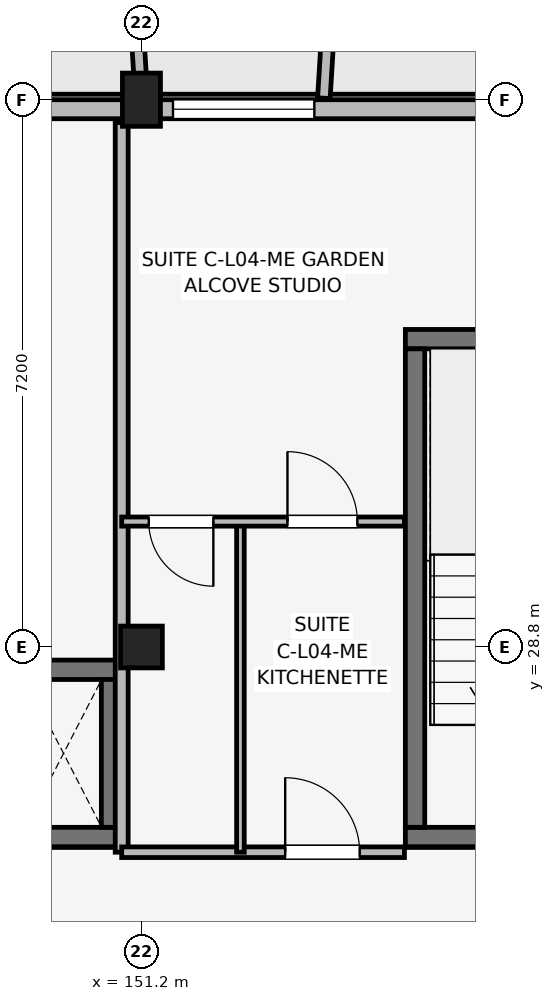
"""IFC4 building model, lengths in metres.
Left out: names, types, materials, properties, quantities, classifications, styles, units other than length and angle.
Written with IfcOpenShell. Run it as: python <this file> out.ifc"""

import sys

from ifc_helpers import new_model, si_unit, direction, frame, frame_2d, origin, origin_2d, place, context, subcontext, project, spatial, rectangle, extrude, element, fill, save


model = new_model("IFC4")
c1 = context("Model", 3, precision=1e-05, world=origin(), true_north=direction((0.0, 1.0)))
c2 = subcontext(c1, "Body", "Model", "MODEL_VIEW")
j1 = project(units=[si_unit("LENGTHUNIT", "METRE"), si_unit("PLANEANGLEUNIT", "RADIAN")], contexts=[c1])
p1 = place(None, origin())
s1 = spatial("IfcSite", under=j1, at=p1, CompositionType="ELEMENT")
p2 = place(p1, origin())
s2 = spatial("IfcBuilding", under=s1, at=p2, CompositionType="ELEMENT")
p3 = place(p2, frame((0.0, 0.0, 15.0)))
s3 = spatial("IfcBuildingStorey", under=s2, at=p3, CompositionType="ELEMENT", Elevation=15.0)
p4 = place(p3, frame((151.2, 28.8, 0.0), z_axis=(0.0, 0.0, 1.0), x_axis=(1.0, 0.0, 0.0)))
e1 = element("IfcColumn", 1, at=p4, inside=s3, PredefinedType="COLUMN", context=c2, shape_type="SweptSolid", body=[
    extrude(rectangle(XDim=0.55, YDim=0.55, at=origin_2d()), origin(), (0.0, 0.0, 1.0), 3.15),
])
p5 = place(p3, frame((151.2, 36.0, 0.0), z_axis=(0.0, 0.0, 1.0), x_axis=(1.0, 0.0, 0.0)))
e2 = element("IfcColumn", 2, at=p5, inside=s3, PredefinedType="COLUMN", context=c2, shape_type="SweptSolid", body=[
    extrude(rectangle(XDim=0.5, YDim=0.7, at=origin_2d()), origin(), (0.0, 0.0, 1.0), 3.15),
])
p6 = place(p3, frame((154.673, 26.3, 0.0), z_axis=(0.0, 0.0, 1.0), x_axis=(1.0, 0.0, 0.0)))
e3 = element("IfcWall", 3, at=p6, inside=s3, PredefinedType="SHEAR", context=c2, shape_type="SweptSolid", body=[
    extrude(rectangle(XDim=3.305, YDim=0.255, at=frame_2d((1.652, 0.0))), origin(), (0.0, 0.0, 1.0), 3.15),
])
p7 = place(p6, frame((1.127, 0.0, 0.0)))
e4 = element("IfcOpeningElement", 4, at=p7, cuts=e3, PredefinedType="OPENING", context=c2, shape_type="SweptSolid", body=[
    extrude(rectangle(XDim=1.05, YDim=2.12, at=frame_2d((0.525, 1.06))), frame((0.0, 0.137, 0.0), z_axis=(0.0, -1.0, 0.0), x_axis=(1.0, 0.0, 0.0)), (0.0, 0.0, 1.0), 0.275),
])
p8 = place(p3, frame((154.673, 32.85, 0.0), z_axis=(0.0, 0.0, 1.0), x_axis=(1.0, 0.0, 0.0)))
e5 = element("IfcWall", 5, at=p8, inside=s3, PredefinedType="SHEAR", context=c2, shape_type="SweptSolid", body=[
    extrude(rectangle(XDim=3.305, YDim=0.255, at=frame_2d((1.652, 0.0))), origin(), (0.0, 0.0, 1.0), 3.15),
])
p9 = place(p3, frame((154.8, 26.427, 0.0), z_axis=(0.0, 0.0, 1.0), x_axis=(0.0, 1.0, 0.0)))
e6 = element("IfcWall", 6, at=p9, inside=s3, PredefinedType="SHEAR", context=c2, shape_type="SweptSolid", body=[
    extrude(rectangle(XDim=6.295, YDim=0.255, at=frame_2d((3.147, 0.0))), origin(), (0.0, 0.0, 1.0), 3.15),
])
for number, where, z_axis, x_axis in (
    (7, (149.123, 26.3, 0.0), (0.0, 0.0, 1.0), (1.0, 0.0, 0.0)),
    (8, (149.123, 28.5, 0.0), (0.0, 0.0, 1.0), (1.0, 0.0, 0.0)),
):
    element("IfcWall", number, at=place(p3, frame(where, z_axis=z_axis, x_axis=x_axis)), inside=s3, PredefinedType="SHEAR", context=c2, shape_type="SweptSolid", body=[
        extrude(rectangle(XDim=1.805, YDim=0.255, at=frame_2d((0.902, 0.0))), origin(), (0.0, 0.0, 1.0), 3.15),
    ])
p10 = place(p3, frame((150.8, 26.427, 0.0), z_axis=(0.0, 0.0, 1.0), x_axis=(0.0, 1.0, 0.0)))
e9 = element("IfcWall", 9, at=p10, inside=s3, PredefinedType="SHEAR", context=c2, shape_type="SweptSolid", body=[
    extrude(rectangle(XDim=1.945, YDim=0.255, at=frame_2d((0.973, 0.0))), origin(), (0.0, 0.0, 1.0), 3.15),
])
p11 = place(p3, frame((162.6, 35.875, 0.0), z_axis=(0.0, 0.0, 1.0), x_axis=(-1.0, 0.0, 0.0)))
e10 = element("IfcWall", 10, at=p11, inside=s3, PredefinedType="SOLIDWALL", context=c2, shape_type="SweptSolid", body=[
    extrude(rectangle(XDim=30.0, YDim=0.25, at=frame_2d((15.0, 0.0))), origin(), (0.0, 0.0, 1.0), 2.43),
])
p12 = place(p11, frame((27.95, 0.0, 0.0), z_axis=(0.0, 0.0, 1.0), x_axis=(-1.0, 0.0, 0.0)))
e11 = element("IfcOpeningElement", 11, at=p12, cuts=e10, PredefinedType="OPENING", context=c2, shape_type="SweptSolid", body=[
    extrude(rectangle(XDim=1.5, YDim=2.15, at=frame_2d((0.75, 1.075))), frame((0.0, 0.135, 0.0), z_axis=(0.0, -1.0, 0.0), x_axis=(1.0, 0.0, 0.0)), (0.0, 0.0, 1.0), 0.27),
])
p13 = place(p11, frame((3.55, 0.0, 0.0), z_axis=(0.0, 0.0, 1.0), x_axis=(-1.0, 0.0, 0.0)))
e12 = element("IfcOpeningElement", 12, at=p13, cuts=e10, PredefinedType="OPENING", context=c2, shape_type="SweptSolid", body=[
    extrude(rectangle(XDim=1.5, YDim=2.15, at=frame_2d((0.75, 1.075))), frame((0.0, 0.135, 0.0), z_axis=(0.0, -1.0, 0.0), x_axis=(1.0, 0.0, 0.0)), (0.0, 0.0, 1.0), 0.27),
])
p14 = place(p11, frame((14.55, 0.0, 0.5)))
e13 = element("IfcOpeningElement", 13, at=p14, cuts=e10, PredefinedType="OPENING", context=c2, shape_type="SweptSolid", body=[
    extrude(rectangle(XDim=0.9, YDim=1.8, at=frame_2d((0.45, 0.9))), frame((0.0, 0.135, 0.0), z_axis=(0.0, -1.0, 0.0), x_axis=(1.0, 0.0, 0.0)), (0.0, 0.0, 1.0), 0.27),
])
p15 = place(p11, frame((9.125, 0.0, 0.7)))
e14 = element("IfcOpeningElement", 14, at=p15, cuts=e10, PredefinedType="OPENING", context=c2, shape_type="SweptSolid", body=[
    extrude(rectangle(XDim=1.86, YDim=1.6, at=frame_2d((0.93, 0.8))), frame((0.0, 0.135, 0.0), z_axis=(0.0, -1.0, 0.0), x_axis=(1.0, 0.0, 0.0)), (0.0, 0.0, 1.0), 0.27),
])
p16 = place(p11, frame((19.155, 0.0, 0.7)))
e15 = element("IfcOpeningElement", 15, at=p16, cuts=e10, PredefinedType="OPENING", context=c2, shape_type="SweptSolid", body=[
    extrude(rectangle(XDim=1.58, YDim=1.6, at=frame_2d((0.79, 0.8))), frame((0.0, 0.135, 0.0), z_axis=(0.0, -1.0, 0.0), x_axis=(1.0, 0.0, 0.0)), (0.0, 0.0, 1.0), 0.27),
])
p17 = place(p3, frame((151.2, 36.02, 0.0), z_axis=(0.0, 0.0, 1.0), x_axis=(-0.061046865508, 0.998134900808, 0.0)))
e16 = element("IfcWall", 16, at=p17, inside=s3, PredefinedType="ELEMENTEDWALL", context=c2, shape_type="SweptSolid", body=[
    extrude(rectangle(XDim=1.964, YDim=0.165, at=frame_2d((0.982, 0.0))), origin(), (0.0, 0.0, 1.0), 2.95),
])
p18 = place(p3, frame((153.6, 36.02, 0.0), z_axis=(0.0, 0.0, 1.0), x_axis=(0.061046865508, 0.998134900808, 0.0)))
e17 = element("IfcWall", 17, at=p18, inside=s3, PredefinedType="ELEMENTEDWALL", context=c2, shape_type="SweptSolid", body=[
    extrude(rectangle(XDim=1.964, YDim=0.165, at=frame_2d((0.982, 0.0))), origin(), (0.0, 0.0, 1.0), 2.45),
])
p19 = place(p3, frame((150.94, 26.1, 0.0), z_axis=(0.0, 0.0, 1.0), x_axis=(0.0, 1.0, 0.0)))
e18 = element("IfcWall", 18, at=p19, inside=s3, PredefinedType="PARTITIONING", context=c2, shape_type="SweptSolid", body=[
    extrude(rectangle(XDim=9.6, YDim=0.17, at=frame_2d((4.8, 0.0))), origin(), (0.0, 0.0, 1.0), 2.38),
])
p20 = place(p3, frame((150.94, 26.1, 0.0), z_axis=(0.0, 0.0, 1.0), x_axis=(1.0, 0.0, 0.0)))
e19 = element("IfcWall", 19, at=p20, inside=s3, PredefinedType="PARTITIONING", context=c2, shape_type="SweptSolid", body=[
    extrude(rectangle(XDim=3.72, YDim=0.14, at=frame_2d((1.86, 0.0))), origin(), (0.0, 0.0, 1.0), 2.38),
])
p21 = place(p20, frame((2.151, 0.0, 0.0)))
e20 = element("IfcOpeningElement", 20, at=p21, cuts=e19, PredefinedType="OPENING", context=c2, shape_type="SweptSolid", body=[
    extrude(rectangle(XDim=0.98, YDim=2.1, at=frame_2d((0.49, 1.05))), frame((0.0, 0.08, 0.0), z_axis=(0.0, -1.0, 0.0), x_axis=(1.0, 0.0, 0.0)), (0.0, 0.0, 1.0), 0.16),
])
p22 = place(p3, frame((152.502, 26.1, 0.0), z_axis=(0.0, 0.0, 1.0), x_axis=(0.0, 1.0, 0.0)))
e21 = element("IfcWall", 21, at=p22, inside=s3, PredefinedType="PARTITIONING", context=c2, shape_type="SweptSolid", body=[
    extrude(rectangle(XDim=4.35, YDim=0.1, at=frame_2d((2.175, 0.0))), origin(), (0.0, 0.0, 1.0), 2.375),
])
p23 = place(p3, frame((150.94, 30.45, 0.0), z_axis=(0.0, 0.0, 1.0), x_axis=(1.0, 0.0, 0.0)))
e22 = element("IfcWall", 22, at=p23, inside=s3, PredefinedType="PARTITIONING", context=c2, shape_type="SweptSolid", body=[
    extrude(rectangle(XDim=3.72, YDim=0.12, at=frame_2d((1.86, 0.0))), origin(), (0.0, 0.0, 1.0), 2.38),
])
p24 = place(p23, frame((1.206, 0.0, 0.0), z_axis=(0.0, 0.0, 1.0), x_axis=(-1.0, 0.0, 0.0)))
e23 = element("IfcOpeningElement", 23, at=p24, cuts=e22, PredefinedType="OPENING", context=c2, shape_type="SweptSolid", body=[
    extrude(rectangle(XDim=0.85, YDim=2.08, at=frame_2d((0.425, 1.04))), frame((0.0, 0.07, 0.0), z_axis=(0.0, -1.0, 0.0), x_axis=(1.0, 0.0, 0.0)), (0.0, 0.0, 1.0), 0.14),
])
p25 = place(p23, frame((2.181, 0.0, 0.0)))
e24 = element("IfcOpeningElement", 24, at=p25, cuts=e22, PredefinedType="OPENING", context=c2, shape_type="SweptSolid", body=[
    extrude(rectangle(XDim=0.92, YDim=2.08, at=frame_2d((0.46, 1.04))), frame((0.0, 0.07, 0.0), z_axis=(0.0, -1.0, 0.0), x_axis=(1.0, 0.0, 0.0)), (0.0, 0.0, 1.0), 0.14),
])
p26 = place(p15, origin())
e25 = element("IfcWindow", 25, at=p26, inside=s3, PartitioningType="SINGLE_PANEL", PredefinedType="WINDOW", context=c2, shape_type="SweptSolid", body=[
    extrude(rectangle(XDim=1.86, YDim=1.6, at=frame_2d((0.93, 0.8))), frame((0.0, 0.03, 0.0), z_axis=(0.0, -1.0, 0.0), x_axis=(1.0, 0.0, 0.0)), (0.0, 0.0, 1.0), 0.06),
])
fill(e14, e25)
p27 = place(p21, origin())
e26 = element("IfcDoor", 26, at=p27, inside=s3, OperationType="SINGLE_SWING_LEFT", PredefinedType="DOOR", context=c2, shape_type="SweptSolid", body=[
    extrude(rectangle(XDim=0.98, YDim=2.1, at=frame_2d((0.49, 1.05))), frame((0.0, 0.025, 0.0), z_axis=(0.0, -1.0, 0.0), x_axis=(1.0, 0.0, 0.0)), (0.0, 0.0, 1.0), 0.05),
])
fill(e20, e26)
p28 = place(p24, origin())
e27 = element("IfcDoor", 27, at=p28, inside=s3, OperationType="SINGLE_SWING_RIGHT", PredefinedType="DOOR", context=c2, shape_type="SweptSolid", body=[
    extrude(rectangle(XDim=0.85, YDim=2.08, at=frame_2d((0.425, 1.04))), frame((0.0, 0.025, 0.0), z_axis=(0.0, -1.0, 0.0), x_axis=(1.0, 0.0, 0.0)), (0.0, 0.0, 1.0), 0.05),
])
fill(e23, e27)
p29 = place(p25, origin())
e28 = element("IfcDoor", 28, at=p29, inside=s3, OperationType="SINGLE_SWING_LEFT", PredefinedType="DOOR", context=c2, shape_type="SweptSolid", body=[
    extrude(rectangle(XDim=0.92, YDim=2.08, at=frame_2d((0.46, 1.04))), frame((0.0, 0.025, 0.0), z_axis=(0.0, -1.0, 0.0), x_axis=(1.0, 0.0, 0.0)), (0.0, 0.0, 1.0), 0.05),
])
fill(e24, e28)
save(model, sys.argv[1])
